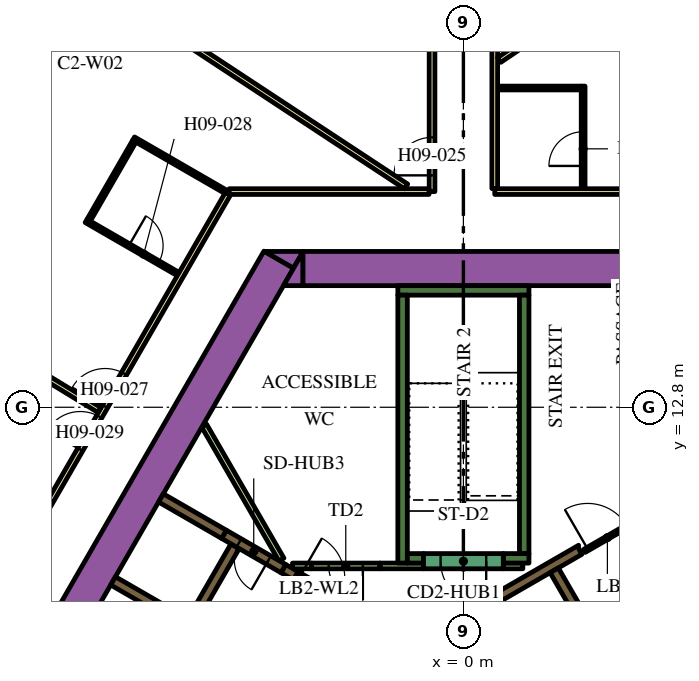
"""IFC4 building model, lengths in metres.
Left out: names, types, materials, properties, quantities, classifications, styles, units other than length and angle.
Written with IfcOpenShell. Run it as: python <this file> out.ifc"""

import sys

from ifc_helpers import new_model, si_unit, direction, frame, frame_2d, origin, place, context, subcontext, project, spatial, polyline, rectangle, outline, extrude, element, fill, save


model = new_model("IFC4")
c1 = context("Model", 3, precision=1e-05, world=origin(), true_north=direction((0.0, 1.0)))
c2 = subcontext(c1, "Body", "Model", "MODEL_VIEW")
j1 = project(units=[si_unit("LENGTHUNIT", "METRE"), si_unit("PLANEANGLEUNIT", "RADIAN")], contexts=[c1])
p1 = place(None, origin())
s1 = spatial("IfcSite", under=j1, at=p1, CompositionType="ELEMENT")
p2 = place(p1, origin())
s2 = spatial("IfcBuilding", under=s1, at=p2, CompositionType="ELEMENT")
p3 = place(p2, frame((0.0, 0.0, 118.8)))
s3 = spatial("IfcBuildingStorey", under=s2, at=p3, CompositionType="ELEMENT", Elevation=118.8)
p4 = place(p3, frame((-15.36, -1.503, 0.0), z_axis=(0.0, 0.0, 1.0), x_axis=(0.50000389221, 0.866023156604, 0.0)))
e1 = element("IfcWall", 1, at=p4, inside=s3, PredefinedType="SOLIDWALL", context=c2, shape_type="SweptSolid", body=[
    extrude(rectangle(XDim=21.0, YDim=0.9, at=frame_2d((10.5, 0.0))), origin(), (0.0, 0.0, 1.0), 3.9),
])
p5 = place(p3, origin())
e2 = element("IfcWall", 2, at=p5, inside=s3, PredefinedType="SOLIDWALL", context=c2, shape_type="SweptSolid", body=[
    extrude(outline(polyline([(-4.215, 16.9), (-4.469, 16.46), (-5.231, 16.9), (-4.215, 16.9)])), origin(), (0.0, 0.0, 1.0), 3.9),
])
p6 = place(p3, frame((-4.224, 16.45, 0.0), z_axis=(0.0, 0.0, 1.0), x_axis=(1.0, 0.0, 0.0)))
e3 = element("IfcWall", 3, at=p6, inside=s3, PredefinedType="SOLIDWALL", context=c2, shape_type="SweptSolid", body=[
    extrude(rectangle(XDim=9.488, YDim=0.9, at=frame_2d((4.744, 0.0))), origin(), (0.0, 0.0, 1.0), 3.9),
])
e4 = element("IfcWall", 4, at=p5, inside=s3, PredefinedType="SOLIDWALL", context=c2, shape_type="SweptSolid", body=[
    extrude(outline(polyline([(-4.734, 16.0), (-4.226, 16.88), (-4.226, 16.0), (-4.734, 16.0)])), origin(), (0.0, 0.0, 1.0), 3.9),
])
p7 = place(p3, frame((-1.725, 15.875, 0.0), z_axis=(0.0, 0.0, 1.0), x_axis=(1.0, 0.0, 0.0)))
e5 = element("IfcWall", 5, at=p7, inside=s3, PredefinedType="SOLIDWALL", context=c2, shape_type="SweptSolid", body=[
    extrude(rectangle(XDim=3.45, YDim=0.25, at=frame_2d((1.725, 0.0))), origin(), (0.0, 0.0, 1.0), 3.9),
])
p8 = place(p3, frame((1.6, 8.95, 0.0), z_axis=(0.0, 0.0, 1.0), x_axis=(0.0, 1.0, 0.0)))
e6 = element("IfcWall", 6, at=p8, inside=s3, PredefinedType="SOLIDWALL", context=c2, shape_type="SweptSolid", body=[
    extrude(rectangle(XDim=6.8, YDim=0.25, at=frame_2d((3.4, 0.0))), origin(), (0.0, 0.0, 1.0), 3.9),
])
p9 = place(p3, frame((1.05, 8.825, 0.0), z_axis=(0.0, 0.0, 1.0), x_axis=(1.0, 0.0, 0.0)))
e7 = element("IfcWall", 7, at=p9, inside=s3, PredefinedType="SOLIDWALL", context=c2, shape_type="SweptSolid", body=[
    extrude(rectangle(XDim=0.675, YDim=0.25, at=frame_2d((0.337, 0.0))), origin(), (0.0, 0.0, 1.0), 3.9),
])
p10 = place(p3, frame((-1.6, 8.7, 0.0), z_axis=(0.0, 0.0, 1.0), x_axis=(0.0, 1.0, 0.0)))
e8 = element("IfcWall", 8, at=p10, inside=s3, PredefinedType="SOLIDWALL", context=c2, shape_type="SweptSolid", body=[
    extrude(rectangle(XDim=7.05, YDim=0.25, at=frame_2d((3.525, 0.0))), origin(), (0.0, 0.0, 1.0), 3.9),
])
p11 = place(p3, frame((-1.475, 8.825, 0.0), z_axis=(0.0, 0.0, 1.0), x_axis=(1.0, 0.0, 0.0)))
e9 = element("IfcWall", 9, at=p11, inside=s3, PredefinedType="SOLIDWALL", context=c2, shape_type="SweptSolid", body=[
    extrude(rectangle(XDim=0.425, YDim=0.25, at=frame_2d((0.212, 0.0))), origin(), (0.0, 0.0, 1.0), 3.9),
])
e10 = element("IfcWall", 10, at=p5, inside=s3, PredefinedType="SOLIDWALL", context=c2, shape_type="SweptSolid", body=[
    extrude(outline(polyline([(2.776, 8.733), (2.499, 8.573), (2.498, 8.573), (2.498, 8.573), (2.282, 8.448), (2.282, 8.448), (0.377, 7.348), (0.16, 7.223), (0.035, 7.439), (3.032, 9.169), (3.03, 9.152), (3.03, 9.133), (3.031, 9.113), (3.035, 9.094), (3.04, 9.075), (3.047, 9.057), (3.056, 9.039), (3.119, 8.931), (2.776, 8.733)])), origin(), (0.0, 0.0, 1.0), 3.9),
])
e11 = element("IfcWall", 11, at=p5, inside=s3, PredefinedType="SOLIDWALL", context=c2, shape_type="SweptSolid", body=[
    extrude(outline(polyline([(-3.128, 7.481), (-3.259, 7.557), (-3.134, 7.773), (-3.003, 7.698), (-3.128, 7.481)])), origin(), (0.0, 0.0, 1.0), 3.9),
])
p12 = place(p3, frame((-7.314, 7.132, 0.0), z_axis=(0.0, 0.0, 1.0), x_axis=(-0.866008176907, 0.50002983664, 0.0)))
e12 = element("IfcWall", 12, at=p12, inside=s3, PredefinedType="SOLIDWALL", context=c2, shape_type="SweptSolid", body=[
    extrude(rectangle(XDim=2.2, YDim=0.25, at=frame_2d((1.1, 0.0))), origin(), (0.0, 0.0, 1.0), 3.9),
])
p13 = place(p3, frame((-6.296, 9.455, 0.0), z_axis=(0.0, 0.0, 1.0), x_axis=(-0.866011930837, 0.500023335103, 0.0)))
e13 = element("IfcWall", 13, at=p13, inside=s3, PredefinedType="SOLIDWALL", context=c2, shape_type="SweptSolid", body=[
    extrude(rectangle(XDim=1.92, YDim=0.25, at=frame_2d((0.96, 0.0))), origin(), (0.0, 0.0, 1.0), 3.9),
])
p14 = place(p3, frame((-4.409, 8.365, 0.0), z_axis=(0.0, 0.0, 1.0), x_axis=(-0.866057014183, 0.499945245186, 0.0)))
e14 = element("IfcWall", 14, at=p14, inside=s3, PredefinedType="SOLIDWALL", context=c2, shape_type="SweptSolid", body=[
    extrude(rectangle(XDim=0.379, YDim=0.25, at=frame_2d((0.19, 0.0))), origin(), (0.0, 0.0, 1.0), 3.9),
])
p15 = place(p3, frame((-2.195, 8.625, 0.0), z_axis=(0.0, 0.0, 1.0), x_axis=(1.0, 0.0, 0.0)))
e15 = element("IfcWall", 15, at=p15, inside=s3, PredefinedType="PARTITIONING", context=c2, shape_type="SweptSolid", body=[
    extrude(rectangle(XDim=1.145, YDim=0.15, at=frame_2d((0.573, 0.0))), origin(), (0.0, 0.0, 1.0), 2.75),
])
p16 = place(p3, frame((-6.823, 12.318, 0.0), z_axis=(0.0, 0.0, 1.0), x_axis=(0.500007885066, -0.866020851292, 0.0)))
e16 = element("IfcWall", 16, at=p16, inside=s3, PredefinedType="PARTITIONING", context=c2, shape_type="SweptSolid", body=[
    extrude(rectangle(XDim=4.072, YDim=0.15, at=frame_2d((2.036, 0.0))), origin(), (0.0, 0.0, 1.0), 2.75),
])
p17 = place(p3, frame((-4.498, 8.625, 0.0), z_axis=(0.0, 0.0, 1.0), x_axis=(1.0, 0.0, 0.0)))
e17 = element("IfcWall", 17, at=p17, inside=s3, PredefinedType="PARTITIONING", context=c2, shape_type="SweptSolid", body=[
    extrude(rectangle(XDim=0.502, YDim=0.15, at=frame_2d((0.251, 0.0))), origin(), (0.0, 0.0, 1.0), 2.75),
])
p18 = place(p3, frame((1.05, 8.625, 0.0), z_axis=(0.0, 0.0, 1.0), x_axis=(1.0, 0.0, 0.0)))
e18 = element("IfcWall", 18, at=p18, inside=s3, PredefinedType="PARTITIONING", context=c2, shape_type="SweptSolid", body=[
    extrude(rectangle(XDim=0.514, YDim=0.15, at=frame_2d((0.257, 0.0))), origin(), (0.0, 0.0, 1.0), 2.75),
])
p19 = place(p3, frame((8.565, -2.185, 0.0), z_axis=(0.0, 0.0, 1.0), x_axis=(-0.499997954832, 0.866026584559, 0.0)))
e19 = element("IfcWall", 19, at=p19, inside=s3, PredefinedType="SOLIDWALL", context=c2, shape_type="SweptSolid", body=[
    extrude(rectangle(XDim=12.35, YDim=0.25, at=frame_2d((6.175, 0.0))), origin(), (0.0, 0.0, 1.0), 3.9),
])
p20 = place(p19, frame((5.725, 0.0, 0.0)))
e20 = element("IfcOpeningElement", 20, at=p20, cuts=e19, PredefinedType="OPENING", context=c2, shape_type="SweptSolid", body=[
    extrude(rectangle(XDim=0.9, YDim=2.1, at=frame_2d((0.45, 1.05))), frame((0.0, 0.135, 0.0), z_axis=(0.0, -1.0, 0.0), x_axis=(1.0, 0.0, 0.0)), (0.0, 0.0, 1.0), 0.27),
])
p21 = place(p3, frame((-6.008, 9.144, 0.0), z_axis=(0.0, 0.0, 1.0), x_axis=(-0.500006956611, -0.866021387346, 0.0)))
e21 = element("IfcWall", 21, at=p21, inside=s3, PredefinedType="SOLIDWALL", context=c2, shape_type="SweptSolid", body=[
    extrude(rectangle(XDim=9.83, YDim=0.25, at=frame_2d((4.915, 0.0))), origin(), (0.0, 0.0, 1.0), 3.9),
])
p22 = place(p21, frame((6.985, 0.0, 0.0)))
e22 = element("IfcOpeningElement", 22, at=p22, cuts=e21, PredefinedType="OPENING", context=c2, shape_type="SweptSolid", body=[
    extrude(rectangle(XDim=0.9, YDim=2.1, at=frame_2d((0.45, 1.05))), frame((0.0, 0.135, 0.0), z_axis=(0.0, -1.0, 0.0), x_axis=(1.0, 0.0, 0.0)), (0.0, 0.0, 1.0), 0.27),
])
p23 = place(p3, frame((1.05, 8.75, 0.0), z_axis=(0.0, 0.0, 1.0), x_axis=(-1.0, 0.0, 0.0)))
e23 = element("IfcWall", 23, at=p23, inside=s3, PredefinedType="SOLIDWALL", context=c2, shape_type="SweptSolid", body=[
    extrude(rectangle(XDim=2.1, YDim=0.4, at=frame_2d((1.05, 0.0))), origin(), (0.0, 0.0, 1.0), 3.9),
])
p24 = place(p23, frame((0.45, 0.0, 0.0)))
e24 = element("IfcOpeningElement", 24, at=p24, cuts=e23, PredefinedType="OPENING", context=c2, shape_type="SweptSolid", body=[
    extrude(rectangle(XDim=1.2, YDim=2.1, at=frame_2d((0.6, 1.05))), frame((0.0, 0.21, 0.0), z_axis=(0.0, -1.0, 0.0), x_axis=(1.0, 0.0, 0.0)), (0.0, 0.0, 1.0), 0.42),
])
p25 = place(p3, frame((-2.195, 8.625, 0.0), z_axis=(0.0, 0.0, 1.0), x_axis=(-1.0, 0.0, 0.0)))
e25 = element("IfcWall", 25, at=p25, inside=s3, PredefinedType="PARTITIONING", context=c2, shape_type="SweptSolid", body=[
    extrude(rectangle(XDim=1.8, YDim=0.15, at=frame_2d((0.9, 0.0))), origin(), (0.0, 0.0, 1.0), 2.75),
])
p26 = place(p25, frame((0.45, 0.0, 0.0)))
e26 = element("IfcOpeningElement", 26, at=p26, cuts=e25, PredefinedType="OPENING", context=c2, shape_type="SweptSolid", body=[
    extrude(rectangle(XDim=0.9, YDim=2.1, at=frame_2d((0.45, 1.05))), frame((0.0, 0.085, 0.0), z_axis=(0.0, -1.0, 0.0), x_axis=(1.0, 0.0, 0.0)), (0.0, 0.0, 1.0), 0.17),
])
p27 = place(p3, frame((3.183, 9.02, 0.0), z_axis=(0.0, 0.0, 1.0), x_axis=(0.866034573852, 0.49998411664, 0.0)))
e27 = element("IfcWall", 27, at=p27, inside=s3, PredefinedType="PARTITIONING", context=c2, shape_type="SweptSolid", body=[
    extrude(rectangle(XDim=1.4, YDim=0.09, at=frame_2d((0.7, 0.0))), origin(), (0.0, 0.0, 1.0), 2.75),
])
p28 = place(p27, frame((0.1, 0.0, 0.0)))
e28 = element("IfcOpeningElement", 28, at=p28, cuts=e27, PredefinedType="OPENING", context=c2, shape_type="SweptSolid", body=[
    extrude(rectangle(XDim=1.2, YDim=2.1, at=frame_2d((0.6, 1.05))), frame((0.0, 0.055, 0.0), z_axis=(0.0, -1.0, 0.0), x_axis=(1.0, 0.0, 0.0)), (0.0, 0.0, 1.0), 0.11),
])
p29 = place(p3, frame((-4.409, 8.365, 0.0), z_axis=(0.0, 0.0, 1.0), x_axis=(0.866034573852, -0.49998411664, 0.0)))
e29 = element("IfcWall", 29, at=p29, inside=s3, PredefinedType="SOLIDWALL", context=c2, shape_type="SweptSolid", body=[
    extrude(rectangle(XDim=1.4, YDim=0.25, at=frame_2d((0.7, 0.0))), origin(), (0.0, 0.0, 1.0), 3.9),
])
p30 = place(p29, frame((0.1, 0.0, 0.0)))
e30 = element("IfcOpeningElement", 30, at=p30, cuts=e29, PredefinedType="OPENING", context=c2, shape_type="SweptSolid", body=[
    extrude(rectangle(XDim=1.2, YDim=2.1, at=frame_2d((0.6, 1.05))), frame((0.0, 0.135, 0.0), z_axis=(0.0, -1.0, 0.0), x_axis=(1.0, 0.0, 0.0)), (0.0, 0.0, 1.0), 0.27),
])
p31 = place(p3, frame((-4.737, 8.555, 0.0), z_axis=(0.0, 0.0, 1.0), x_axis=(-0.865989075817, 0.500062916607, 0.0)))
e31 = element("IfcWall", 31, at=p31, inside=s3, PredefinedType="SOLIDWALL", context=c2, shape_type="SweptSolid", body=[
    extrude(rectangle(XDim=1.8, YDim=0.25, at=frame_2d((0.9, 0.0))), origin(), (0.0, 0.0, 1.0), 3.9),
])
p32 = place(p31, frame((0.45, 0.0, 0.0)))
e32 = element("IfcOpeningElement", 32, at=p32, cuts=e31, PredefinedType="OPENING", context=c2, shape_type="SweptSolid", body=[
    extrude(rectangle(XDim=0.9, YDim=2.1, at=frame_2d((0.45, 1.05))), frame((0.0, 0.135, 0.0), z_axis=(0.0, -1.0, 0.0), x_axis=(1.0, 0.0, 0.0)), (0.0, 0.0, 1.0), 0.27),
])
p33 = place(p3, frame((0.825, 18.475, 0.0), z_axis=(0.0, 0.0, 1.0), x_axis=(1.0, 0.0, 0.0)))
e33 = element("IfcWall", 33, at=p33, inside=s3, PredefinedType="PARTITIONING", context=c2, shape_type="SweptSolid", body=[
    extrude(rectangle(XDim=5.268, YDim=0.15, at=frame_2d((2.634, 0.0))), origin(), (0.0, 0.0, 1.0), 2.75),
])
p34 = place(p33, frame((4.088, 0.0, 0.0)))
e34 = element("IfcOpeningElement", 34, at=p34, cuts=e33, PredefinedType="OPENING", context=c2, shape_type="SweptSolid", body=[
    extrude(rectangle(XDim=1.0, YDim=2.1, at=frame_2d((0.5, 1.05))), frame((0.0, 0.085, 0.0), z_axis=(0.0, -1.0, 0.0), x_axis=(1.0, 0.0, 0.0)), (0.0, 0.0, 1.0), 0.17),
])
p35 = place(p3, frame((0.825, 32.098, 0.0), z_axis=(0.0, 0.0, 1.0), x_axis=(0.0, -1.0, 0.0)))
e35 = element("IfcWall", 35, at=p35, inside=s3, PredefinedType="PARTITIONING", context=c2, shape_type="SweptSolid", body=[
    extrude(rectangle(XDim=13.543, YDim=0.15, at=frame_2d((6.772, 0.0))), origin(), (0.0, 0.0, 1.0), 2.75),
])
p36 = place(p35, frame((8.49, 0.0, 0.0)))
e36 = element("IfcOpeningElement", 36, at=p36, cuts=e35, PredefinedType="OPENING", context=c2, shape_type="SweptSolid", body=[
    extrude(rectangle(XDim=1.0, YDim=2.1, at=frame_2d((0.5, 1.05))), frame((0.0, 0.085, 0.0), z_axis=(0.0, -1.0, 0.0), x_axis=(1.0, 0.0, 0.0)), (0.0, 0.0, 1.0), 0.17),
])
p37 = place(p3, frame((-0.825, 18.475, 0.0), z_axis=(0.0, 0.0, 1.0), x_axis=(0.0, 1.0, 0.0)))
e37 = element("IfcWall", 37, at=p37, inside=s3, PredefinedType="PARTITIONING", context=c2, shape_type="SweptSolid", body=[
    extrude(rectangle(XDim=13.623, YDim=0.15, at=frame_2d((6.812, 0.0))), origin(), (0.0, 0.0, 1.0), 2.75),
])
p38 = place(p37, frame((0.427, 0.0, 0.0)))
e38 = element("IfcOpeningElement", 38, at=p38, cuts=e37, PredefinedType="OPENING", context=c2, shape_type="SweptSolid", body=[
    extrude(rectangle(XDim=1.0, YDim=2.1, at=frame_2d((0.5, 1.05))), frame((0.0, 0.085, 0.0), z_axis=(0.0, -1.0, 0.0), x_axis=(1.0, 0.0, 0.0)), (0.0, 0.0, 1.0), 0.17),
])
p39 = place(p3, frame((-6.163, 18.475, 0.0), z_axis=(0.0, 0.0, 1.0), x_axis=(1.0, 0.0, 0.0)))
e39 = element("IfcWall", 39, at=p39, inside=s3, PredefinedType="PARTITIONING", context=c2, shape_type="SweptSolid", body=[
    extrude(rectangle(XDim=5.258, YDim=0.15, at=frame_2d((2.629, 0.0))), origin(), (0.0, 0.0, 1.0), 2.75),
])
p40 = place(p3, frame((-19.081, -3.9, 0.0), z_axis=(0.0, 0.0, 1.0), x_axis=(0.499998313975, 0.866026377209, 0.0)))
e40 = element("IfcWall", 40, at=p40, inside=s3, PredefinedType="PARTITIONING", context=c2, shape_type="SweptSolid", body=[
    extrude(rectangle(XDim=25.766, YDim=0.15, at=frame_2d((12.883, 0.0))), origin(), (0.0, 0.0, 1.0), 2.75),
])
p41 = place(p40, frame((19.306, 0.0, 0.0)))
e41 = element("IfcOpeningElement", 41, at=p41, cuts=e40, PredefinedType="OPENING", context=c2, shape_type="SweptSolid", body=[
    extrude(rectangle(XDim=1.0, YDim=2.1, at=frame_2d((0.5, 1.05))), frame((0.0, 0.085, 0.0), z_axis=(0.0, -1.0, 0.0), x_axis=(1.0, 0.0, 0.0)), (0.0, 0.0, 1.0), 0.17),
])
p42 = place(p40, frame((18.0, 0.0, 0.0)))
e42 = element("IfcOpeningElement", 42, at=p42, cuts=e40, PredefinedType="OPENING", context=c2, shape_type="SweptSolid", body=[
    extrude(rectangle(XDim=1.0, YDim=2.1, at=frame_2d((0.5, 1.05))), frame((0.0, 0.085, 0.0), z_axis=(0.0, -1.0, 0.0), x_axis=(1.0, 0.0, 0.0)), (0.0, 0.0, 1.0), 0.17),
])
p43 = place(p40, frame((7.793, 0.0, 0.0)))
e43 = element("IfcOpeningElement", 43, at=p43, cuts=e40, PredefinedType="OPENING", context=c2, shape_type="SweptSolid", body=[
    extrude(rectangle(XDim=0.9, YDim=2.1, at=frame_2d((0.45, 1.05))), frame((0.0, 0.085, 0.0), z_axis=(0.0, -1.0, 0.0), x_axis=(1.0, 0.0, 0.0)), (0.0, 0.0, 1.0), 0.17),
])
p44 = place(p40, frame((4.674, 0.0, 0.0)))
e44 = element("IfcOpeningElement", 44, at=p44, cuts=e40, PredefinedType="OPENING", context=c2, shape_type="SweptSolid", body=[
    extrude(rectangle(XDim=0.9, YDim=2.1, at=frame_2d((0.45, 1.05))), frame((0.0, 0.085, 0.0), z_axis=(0.0, -1.0, 0.0), x_axis=(1.0, 0.0, 0.0)), (0.0, 0.0, 1.0), 0.17),
])
p45 = place(p40, frame((0.18, 0.0, 0.0)))
e45 = element("IfcOpeningElement", 45, at=p45, cuts=e40, PredefinedType="OPENING", context=c2, shape_type="SweptSolid", body=[
    extrude(rectangle(XDim=1.0, YDim=2.1, at=frame_2d((0.5, 1.05))), frame((0.0, 0.085, 0.0), z_axis=(0.0, -1.0, 0.0), x_axis=(1.0, 0.0, 0.0)), (0.0, 0.0, 1.0), 0.17),
])
p46 = place(p3, frame((-15.225, 16.167, 0.0), z_axis=(0.0, 0.0, 1.0), x_axis=(0.854088713274, -0.520127359266, 0.0)))
e46 = element("IfcWall", 46, at=p46, inside=s3, PredefinedType="PARTITIONING", context=c2, shape_type="SweptSolid", body=[
    extrude(rectangle(XDim=6.611, YDim=0.15, at=frame_2d((3.305, 0.0))), origin(), (0.0, 0.0, 1.0), 2.75),
])
p47 = place(p3, frame((-10.592, 24.589, 0.0), z_axis=(0.0, 0.0, 1.0), x_axis=(0.835337323748, -0.549737715236, 0.0)))
e47 = element("IfcWall", 47, at=p47, inside=s3, PredefinedType="PARTITIONING", context=c2, shape_type="SweptSolid", body=[
    extrude(rectangle(XDim=10.875, YDim=0.15, at=frame_2d((5.438, 0.0))), origin(), (0.0, 0.0, 1.0), 2.75),
])
p48 = place(p3, frame((8.326, 26.923, 0.0), z_axis=(0.0, 0.0, 1.0), x_axis=(-0.828836601893, -0.5594907393, 0.0)))
e48 = element("IfcWall", 48, at=p48, inside=s3, PredefinedType="PARTITIONING", context=c2, shape_type="SweptSolid", body=[
    extrude(rectangle(XDim=8.909, YDim=0.15, at=frame_2d((4.455, 0.0))), origin(), (0.0, 0.0, 1.0), 2.75),
])
p49 = place(p3, frame((3.151, 18.55, 0.0), z_axis=(0.0, 0.0, 1.0), x_axis=(0.0, 1.0, 0.0)))
e49 = element("IfcWall", 49, at=p49, inside=s3, PredefinedType="PARTITIONING", context=c2, shape_type="SweptSolid", body=[
    extrude(rectangle(XDim=2.7, YDim=0.1, at=frame_2d((1.35, 0.0))), origin(), (0.0, 0.0, 1.0), 2.75),
])
p50 = place(p49, frame((0.6, 0.0, 0.0)))
e50 = element("IfcOpeningElement", 50, at=p50, cuts=e49, PredefinedType="OPENING", context=c2, shape_type="SweptSolid", body=[
    extrude(rectangle(XDim=0.9, YDim=2.1, at=frame_2d((0.45, 1.05))), frame((0.0, 0.06, 0.0), z_axis=(0.0, -1.0, 0.0), x_axis=(1.0, 0.0, 0.0)), (0.0, 0.0, 1.0), 0.12),
])
p51 = place(p3, frame((3.101, 21.2, 0.0), z_axis=(0.0, 0.0, 1.0), x_axis=(-1.0, 0.0, 0.0)))
e51 = element("IfcWall", 51, at=p51, inside=s3, PredefinedType="PARTITIONING", context=c2, shape_type="SweptSolid", body=[
    extrude(rectangle(XDim=2.2, YDim=0.1, at=frame_2d((1.1, 0.0))), origin(), (0.0, 0.0, 1.0), 2.75),
])
p52 = place(p3, frame((-9.928, 17.704, 0.0), z_axis=(0.0, 0.0, 1.0), x_axis=(0.866034573852, -0.49998411664, 0.0)))
e52 = element("IfcWall", 52, at=p52, inside=s3, PredefinedType="PARTITIONING", context=c2, shape_type="SweptSolid", body=[
    extrude(rectangle(XDim=2.8, YDim=0.1, at=frame_2d((1.4, 0.0))), origin(), (0.0, 0.0, 1.0), 2.75),
])
p53 = place(p52, frame((1.3, 0.0, 0.0)))
e53 = element("IfcOpeningElement", 53, at=p53, cuts=e52, PredefinedType="OPENING", context=c2, shape_type="SweptSolid", body=[
    extrude(rectangle(XDim=0.9, YDim=2.1, at=frame_2d((0.45, 1.05))), frame((0.0, 0.06, 0.0), z_axis=(0.0, -1.0, 0.0), x_axis=(1.0, 0.0, 0.0)), (0.0, 0.0, 1.0), 0.12),
])
p54 = place(p3, frame((-9.86, 17.722, 0.0), z_axis=(0.0, 0.0, 1.0), x_axis=(0.500001309137, 0.866024647952, 0.0)))
e54 = element("IfcWall", 54, at=p54, inside=s3, PredefinedType="PARTITIONING", context=c2, shape_type="SweptSolid", body=[
    extrude(rectangle(XDim=2.4, YDim=0.1, at=frame_2d((1.2, 0.0))), origin(), (0.0, 0.0, 1.0), 2.75),
])
p55 = place(p3, frame((-6.253, 18.469, 0.0), z_axis=(0.0, 0.0, 1.0), x_axis=(-0.866034573852, 0.49998411664, 0.0)))
e55 = element("IfcWall", 55, at=p55, inside=s3, PredefinedType="PARTITIONING", context=c2, shape_type="SweptSolid", body=[
    extrude(rectangle(XDim=2.8, YDim=0.1, at=frame_2d((1.4, 0.0))), origin(), (0.0, 0.0, 1.0), 2.75),
])
p56 = place(p24, origin())
e56 = element("IfcDoor", 56, at=p56, inside=s3, OperationType="SINGLE_SWING_LEFT", PredefinedType="DOOR", context=c2, shape_type="SweptSolid", body=[
    extrude(rectangle(XDim=1.2, YDim=2.1, at=frame_2d((0.6, 1.05))), frame((0.0, 0.025, 0.0), z_axis=(0.0, -1.0, 0.0), x_axis=(1.0, 0.0, 0.0)), (0.0, 0.0, 1.0), 0.05),
])
fill(e24, e56)
p57 = place(p26, origin())
e57 = element("IfcDoor", 57, at=p57, inside=s3, OperationType="SINGLE_SWING_LEFT", PredefinedType="DOOR", context=c2, shape_type="SweptSolid", body=[
    extrude(rectangle(XDim=0.9, YDim=2.1, at=frame_2d((0.45, 1.05))), frame((0.0, 0.025, 0.0), z_axis=(0.0, -1.0, 0.0), x_axis=(1.0, 0.0, 0.0)), (0.0, 0.0, 1.0), 0.05),
])
fill(e26, e57)
p58 = place(p28, origin())
e58 = element("IfcDoor", 58, at=p58, inside=s3, OperationType="SINGLE_SWING_LEFT", PredefinedType="DOOR", context=c2, shape_type="SweptSolid", body=[
    extrude(rectangle(XDim=1.2, YDim=2.1, at=frame_2d((0.6, 1.05))), frame((0.0, 0.025, 0.0), z_axis=(0.0, -1.0, 0.0), x_axis=(1.0, 0.0, 0.0)), (0.0, 0.0, 1.0), 0.05),
])
fill(e28, e58)
p59 = place(p30, origin())
e59 = element("IfcDoor", 59, at=p59, inside=s3, OperationType="SINGLE_SWING_LEFT", PredefinedType="DOOR", context=c2, shape_type="SweptSolid", body=[
    extrude(rectangle(XDim=1.2, YDim=2.1, at=frame_2d((0.6, 1.05))), frame((0.0, 0.025, 0.0), z_axis=(0.0, -1.0, 0.0), x_axis=(1.0, 0.0, 0.0)), (0.0, 0.0, 1.0), 0.05),
])
fill(e30, e59)
p60 = place(p32, origin())
e60 = element("IfcDoor", 60, at=p60, inside=s3, OperationType="SINGLE_SWING_LEFT", PredefinedType="DOOR", context=c2, shape_type="SweptSolid", body=[
    extrude(rectangle(XDim=0.9, YDim=2.1, at=frame_2d((0.45, 1.05))), frame((0.0, 0.025, 0.0), z_axis=(0.0, -1.0, 0.0), x_axis=(1.0, 0.0, 0.0)), (0.0, 0.0, 1.0), 0.05),
])
fill(e32, e60)
p61 = place(p50, origin())
e61 = element("IfcDoor", 61, at=p61, inside=s3, OperationType="SINGLE_SWING_LEFT", PredefinedType="DOOR", context=c2, shape_type="SweptSolid", body=[
    extrude(rectangle(XDim=0.9, YDim=2.1, at=frame_2d((0.45, 1.05))), frame((0.0, 0.025, 0.0), z_axis=(0.0, -1.0, 0.0), x_axis=(1.0, 0.0, 0.0)), (0.0, 0.0, 1.0), 0.05),
])
fill(e50, e61)
p62 = place(p38, origin())
e62 = element("IfcDoor", 62, at=p62, inside=s3, OperationType="SINGLE_SWING_LEFT", PredefinedType="DOOR", context=c2, shape_type="SweptSolid", body=[
    extrude(rectangle(XDim=1.0, YDim=2.1, at=frame_2d((0.5, 1.05))), frame((0.0, 0.025, 0.0), z_axis=(0.0, -1.0, 0.0), x_axis=(1.0, 0.0, 0.0)), (0.0, 0.0, 1.0), 0.05),
])
fill(e38, e62)
p63 = place(p41, origin())
e63 = element("IfcDoor", 63, at=p63, inside=s3, OperationType="SINGLE_SWING_LEFT", PredefinedType="DOOR", context=c2, shape_type="SweptSolid", body=[
    extrude(rectangle(XDim=1.0, YDim=2.1, at=frame_2d((0.5, 1.05))), frame((0.0, 0.025, 0.0), z_axis=(0.0, -1.0, 0.0), x_axis=(1.0, 0.0, 0.0)), (0.0, 0.0, 1.0), 0.05),
])
fill(e41, e63)
p64 = place(p53, origin())
e64 = element("IfcDoor", 64, at=p64, inside=s3, OperationType="SINGLE_SWING_LEFT", PredefinedType="DOOR", context=c2, shape_type="SweptSolid", body=[
    extrude(rectangle(XDim=0.9, YDim=2.1, at=frame_2d((0.45, 1.05))), frame((0.0, 0.025, 0.0), z_axis=(0.0, -1.0, 0.0), x_axis=(1.0, 0.0, 0.0)), (0.0, 0.0, 1.0), 0.05),
])
fill(e53, e64)
p65 = place(p42, origin())
e65 = element("IfcDoor", 65, at=p65, inside=s3, OperationType="SINGLE_SWING_RIGHT", PredefinedType="DOOR", context=c2, shape_type="SweptSolid", body=[
    extrude(rectangle(XDim=1.0, YDim=2.1, at=frame_2d((0.5, 1.05))), frame((0.0, 0.025, 0.0), z_axis=(0.0, -1.0, 0.0), x_axis=(1.0, 0.0, 0.0)), (0.0, 0.0, 1.0), 0.05),
])
fill(e42, e65)
save(model, sys.argv[1])
